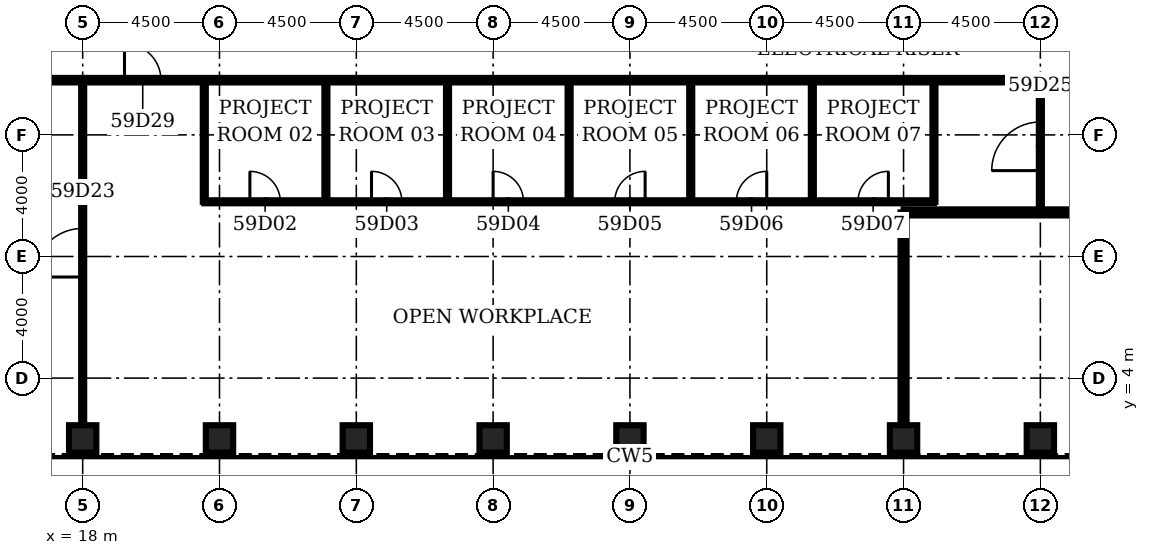
"""IFC4 building model, lengths in metres.
Left out: names, types, materials, properties, quantities, classifications, styles, units other than length and angle.
Written with IfcOpenShell. Run it as: python <this file> out.ifc"""

import sys

from ifc_helpers import new_model, si_unit, direction, frame, frame_2d, origin, origin_2d, place, context, subcontext, project, spatial, rectangle, hollow_rectangle, extrude, element, fill, save


model = new_model("IFC4")
c1 = context("Model", 3, precision=1e-05, world=origin(), true_north=direction((0.0, 1.0)))
c2 = subcontext(c1, "Body", "Model", "MODEL_VIEW")
j1 = project(units=[si_unit("LENGTHUNIT", "METRE"), si_unit("PLANEANGLEUNIT", "RADIAN")], contexts=[c1])
p1 = place(None, origin())
s1 = spatial("IfcSite", under=j1, at=p1, CompositionType="ELEMENT")
p2 = place(p1, origin())
s2 = spatial("IfcBuilding", under=s1, at=p2, CompositionType="ELEMENT")
p3 = place(p2, frame((0.0, 0.0, 261.4)))
s3 = spatial("IfcBuildingStorey", under=s2, at=p3, CompositionType="ELEMENT", Elevation=261.4)
for number, where, z_axis, x_axis in (
    (1, (18.0, 2.0, 0.0), (0.0, 0.0, 1.0), (0.0, 1.0, 0.0)),
    (2, (22.5, 2.0, 0.0), (0.0, 0.0, 1.0), (0.0, 1.0, 0.0)),
    (3, (27.0, 2.0, 0.0), (0.0, 0.0, 1.0), (0.0, 1.0, 0.0)),
    (4, (31.5, 2.0, 0.0), (0.0, 0.0, 1.0), (0.0, 1.0, 0.0)),
    (5, (36.0, 2.0, 0.0), (0.0, 0.0, 1.0), (0.0, 1.0, 0.0)),
    (6, (40.5, 2.0, 0.0), (0.0, 0.0, 1.0), (0.0, 1.0, 0.0)),
    (7, (45.0, 2.0, 0.0), (0.0, 0.0, 1.0), (0.0, 1.0, 0.0)),
    (8, (49.5, 2.0, 0.0), (0.0, 0.0, 1.0), (0.0, 1.0, 0.0)),
):
    element("IfcColumn", number, at=place(p3, frame(where, z_axis=z_axis, x_axis=x_axis)), inside=s3, PredefinedType="COLUMN", context=c2, shape_type="SweptSolid", body=[
        extrude(hollow_rectangle(XDim=0.9, YDim=0.9, WallThickness=0.07, at=origin_2d()), origin(), (0.0, 0.0, 1.0), 4.2),
    ])
p4 = place(p3, frame((45.0, 9.45, 0.0), z_axis=(0.0, 0.0, 1.0), x_axis=(1.0, 0.0, 0.0)))
e9 = element("IfcWall", 9, at=p4, inside=s3, PredefinedType="PARTITIONING", context=c2, shape_type="SweptSolid", body=[
    extrude(rectangle(XDim=18.0, YDim=0.2, at=frame_2d((9.0, 0.0))), origin(), (0.0, 0.0, 1.0), 3.0),
])
p5 = place(p4, frame((8.2, 0.0, 0.0)))
e10 = element("IfcOpeningElement", 10, at=p5, cuts=e9, PredefinedType="OPENING", context=c2, shape_type="SweptSolid", body=[
    extrude(rectangle(XDim=1.6, YDim=2.1, at=frame_2d((0.8, 1.05))), frame((0.0, 0.11, 0.0), z_axis=(0.0, -1.0, 0.0), x_axis=(1.0, 0.0, 0.0)), (0.0, 0.0, 1.0), 0.22),
])
p6 = place(p3, frame((22.0, 9.8, 0.0), z_axis=(0.0, 0.0, 1.0), x_axis=(1.0, 0.0, 0.0)))
e11 = element("IfcWall", 11, at=p6, inside=s3, PredefinedType="PARTITIONING", context=c2, shape_type="SweptSolid", body=[
    extrude(rectangle(XDim=24.0, YDim=0.1, at=frame_2d((12.0, 0.0))), origin(), (0.0, 0.0, 1.0), 3.0),
])
p7 = place(p6, frame((1.5, 0.0, 0.0)))
e12 = element("IfcOpeningElement", 12, at=p7, cuts=e11, PredefinedType="OPENING", context=c2, shape_type="SweptSolid", body=[
    extrude(rectangle(XDim=1.0, YDim=2.1, at=frame_2d((0.5, 1.05))), frame((0.0, 0.06, 0.0), z_axis=(0.0, -1.0, 0.0), x_axis=(1.0, 0.0, 0.0)), (0.0, 0.0, 1.0), 0.12),
])
p8 = place(p6, frame((5.5, 0.0, 0.0)))
e13 = element("IfcOpeningElement", 13, at=p8, cuts=e11, PredefinedType="OPENING", context=c2, shape_type="SweptSolid", body=[
    extrude(rectangle(XDim=1.0, YDim=2.1, at=frame_2d((0.5, 1.05))), frame((0.0, 0.06, 0.0), z_axis=(0.0, -1.0, 0.0), x_axis=(1.0, 0.0, 0.0)), (0.0, 0.0, 1.0), 0.12),
])
p9 = place(p6, frame((9.5, 0.0, 0.0)))
e14 = element("IfcOpeningElement", 14, at=p9, cuts=e11, PredefinedType="OPENING", context=c2, shape_type="SweptSolid", body=[
    extrude(rectangle(XDim=1.0, YDim=2.1, at=frame_2d((0.5, 1.05))), frame((0.0, 0.06, 0.0), z_axis=(0.0, -1.0, 0.0), x_axis=(1.0, 0.0, 0.0)), (0.0, 0.0, 1.0), 0.12),
])
p10 = place(p6, frame((13.5, 0.0, 0.0)))
e15 = element("IfcOpeningElement", 15, at=p10, cuts=e11, PredefinedType="OPENING", context=c2, shape_type="SweptSolid", body=[
    extrude(rectangle(XDim=1.0, YDim=2.1, at=frame_2d((0.5, 1.05))), frame((0.0, 0.06, 0.0), z_axis=(0.0, -1.0, 0.0), x_axis=(1.0, 0.0, 0.0)), (0.0, 0.0, 1.0), 0.12),
])
p11 = place(p6, frame((17.5, 0.0, 0.0)))
e16 = element("IfcOpeningElement", 16, at=p11, cuts=e11, PredefinedType="OPENING", context=c2, shape_type="SweptSolid", body=[
    extrude(rectangle(XDim=1.0, YDim=2.1, at=frame_2d((0.5, 1.05))), frame((0.0, 0.06, 0.0), z_axis=(0.0, -1.0, 0.0), x_axis=(1.0, 0.0, 0.0)), (0.0, 0.0, 1.0), 0.12),
])
p12 = place(p6, frame((21.5, 0.0, 0.0)))
e17 = element("IfcOpeningElement", 17, at=p12, cuts=e11, PredefinedType="OPENING", context=c2, shape_type="SweptSolid", body=[
    extrude(rectangle(XDim=1.0, YDim=2.1, at=frame_2d((0.5, 1.05))), frame((0.0, 0.06, 0.0), z_axis=(0.0, -1.0, 0.0), x_axis=(1.0, 0.0, 0.0)), (0.0, 0.0, 1.0), 0.12),
])
p13 = place(p3, frame((15.2, 13.8, 0.0), z_axis=(0.0, 0.0, 1.0), x_axis=(1.0, 0.0, 0.0)))
e18 = element("IfcWall", 18, at=p13, inside=s3, PredefinedType="PARTITIONING", context=c2, shape_type="SweptSolid", body=[
    extrude(rectangle(XDim=41.6, YDim=0.15, at=frame_2d((20.8, 0.0))), origin(), (0.0, 0.0, 1.0), 3.0),
])
p14 = place(p13, frame((4.175, 0.0, 0.0)))
e19 = element("IfcOpeningElement", 19, at=p14, cuts=e18, PredefinedType="OPENING", context=c2, shape_type="SweptSolid", body=[
    extrude(rectangle(XDim=1.2, YDim=2.1, at=frame_2d((0.6, 1.05))), frame((0.0, 0.085, 0.0), z_axis=(0.0, -1.0, 0.0), x_axis=(1.0, 0.0, 0.0)), (0.0, 0.0, 1.0), 0.17),
])
p15 = place(p3, frame((18.0, 2.45, 0.0), z_axis=(0.0, 0.0, 1.0), x_axis=(0.0, 1.0, 0.0)))
e20 = element("IfcWall", 20, at=p15, inside=s3, PredefinedType="PARTITIONING", context=c2, shape_type="SweptSolid", body=[
    extrude(rectangle(XDim=11.35, YDim=0.1, at=frame_2d((5.675, 0.0))), origin(), (0.0, 0.0, 1.0), 3.0),
])
p16 = place(p15, frame((4.875, 0.0, 0.0)))
e21 = element("IfcOpeningElement", 21, at=p16, cuts=e20, PredefinedType="OPENING", context=c2, shape_type="SweptSolid", body=[
    extrude(rectangle(XDim=1.6, YDim=2.1, at=frame_2d((0.8, 1.05))), frame((0.0, 0.06, 0.0), z_axis=(0.0, -1.0, 0.0), x_axis=(1.0, 0.0, 0.0)), (0.0, 0.0, 1.0), 0.12),
])
p17 = place(p3, frame((22.0, 9.8, 0.0), z_axis=(0.0, 0.0, 1.0), x_axis=(0.0, 1.0, 0.0)))
e22 = element("IfcWall", 22, at=p17, inside=s3, PredefinedType="PARTITIONING", context=c2, shape_type="SweptSolid", body=[
    extrude(rectangle(XDim=4.0, YDim=0.1, at=frame_2d((2.0, 0.0))), origin(), (0.0, 0.0, 1.0), 3.0),
])
p18 = place(p3, frame((26.0, 9.8, 0.0), z_axis=(0.0, 0.0, 1.0), x_axis=(0.0, 1.0, 0.0)))
e23 = element("IfcWall", 23, at=p18, inside=s3, PredefinedType="PARTITIONING", context=c2, shape_type="SweptSolid", body=[
    extrude(rectangle(XDim=4.0, YDim=0.1, at=frame_2d((2.0, 0.0))), origin(), (0.0, 0.0, 1.0), 2.942),
])
for number, where, z_axis, x_axis in (
    (24, (30.0, 9.8, 0.0), (0.0, 0.0, 1.0), (0.0, 1.0, 0.0)),
    (25, (34.0, 9.8, 0.0), (0.0, 0.0, 1.0), (0.0, 1.0, 0.0)),
    (26, (38.0, 9.8, 0.0), (0.0, 0.0, 1.0), (0.0, 1.0, 0.0)),
    (27, (42.0, 9.8, 0.0), (0.0, 0.0, 1.0), (0.0, 1.0, 0.0)),
):
    element("IfcWall", number, at=place(p3, frame(where, z_axis=z_axis, x_axis=x_axis)), inside=s3, PredefinedType="PARTITIONING", context=c2, shape_type="SweptSolid", body=[
        extrude(rectangle(XDim=4.0, YDim=0.1, at=frame_2d((2.0, 0.0))), origin(), (0.0, 0.0, 1.0), 3.0),
    ])
p19 = place(p3, frame((45.0, 2.45, 0.0), z_axis=(0.0, 0.0, 1.0), x_axis=(0.0, 1.0, 0.0)))
e28 = element("IfcWall", 28, at=p19, inside=s3, PredefinedType="PARTITIONING", context=c2, shape_type="SweptSolid", body=[
    extrude(rectangle(XDim=7.0, YDim=0.2, at=frame_2d((3.5, 0.0))), origin(), (0.0, 0.0, 1.0), 3.0),
])
p20 = place(p3, frame((46.0, 9.8, 0.0), z_axis=(0.0, 0.0, 1.0), x_axis=(0.0, 1.0, 0.0)))
e29 = element("IfcWall", 29, at=p20, inside=s3, PredefinedType="PARTITIONING", context=c2, shape_type="SweptSolid", body=[
    extrude(rectangle(XDim=4.0, YDim=0.1, at=frame_2d((2.0, 0.0))), origin(), (0.0, 0.0, 1.0), 2.942),
])
p21 = place(p3, frame((49.5, 9.45, 0.0), z_axis=(0.0, 0.0, 1.0), x_axis=(0.0, 1.0, 0.0)))
e30 = element("IfcWall", 30, at=p21, inside=s3, PredefinedType="PARTITIONING", context=c2, shape_type="SweptSolid", body=[
    extrude(rectangle(XDim=4.35, YDim=0.1, at=frame_2d((2.175, 0.0))), origin(), (0.0, 0.0, 1.0), 3.0),
])
p22 = place(p21, frame((1.375, 0.0, 0.0)))
e31 = element("IfcOpeningElement", 31, at=p22, cuts=e30, PredefinedType="OPENING", context=c2, shape_type="SweptSolid", body=[
    extrude(rectangle(XDim=1.6, YDim=2.1, at=frame_2d((0.8, 1.05))), frame((0.0, 0.06, 0.0), z_axis=(0.0, -1.0, 0.0), x_axis=(1.0, 0.0, 0.0)), (0.0, 0.0, 1.0), 0.12),
])
p23 = place(p7, origin())
e32 = element("IfcDoor", 32, at=p23, inside=s3, OperationType="SINGLE_SWING_LEFT", PredefinedType="DOOR", context=c2, shape_type="SweptSolid", body=[
    extrude(rectangle(XDim=1.0, YDim=2.1, at=frame_2d((0.5, 1.05))), frame((0.0, 0.025, 0.0), z_axis=(0.0, -1.0, 0.0), x_axis=(1.0, 0.0, 0.0)), (0.0, 0.0, 1.0), 0.05),
])
fill(e12, e32)
p24 = place(p8, origin())
e33 = element("IfcDoor", 33, at=p24, inside=s3, OperationType="SINGLE_SWING_LEFT", PredefinedType="DOOR", context=c2, shape_type="SweptSolid", body=[
    extrude(rectangle(XDim=1.0, YDim=2.1, at=frame_2d((0.5, 1.05))), frame((0.0, 0.025, 0.0), z_axis=(0.0, -1.0, 0.0), x_axis=(1.0, 0.0, 0.0)), (0.0, 0.0, 1.0), 0.05),
])
fill(e13, e33)
p25 = place(p9, origin())
e34 = element("IfcDoor", 34, at=p25, inside=s3, OperationType="SINGLE_SWING_LEFT", PredefinedType="DOOR", context=c2, shape_type="SweptSolid", body=[
    extrude(rectangle(XDim=1.0, YDim=2.1, at=frame_2d((0.5, 1.05))), frame((0.0, 0.025, 0.0), z_axis=(0.0, -1.0, 0.0), x_axis=(1.0, 0.0, 0.0)), (0.0, 0.0, 1.0), 0.05),
])
fill(e14, e34)
p26 = place(p10, origin())
e35 = element("IfcDoor", 35, at=p26, inside=s3, OperationType="SINGLE_SWING_RIGHT", PredefinedType="DOOR", context=c2, shape_type="SweptSolid", body=[
    extrude(rectangle(XDim=1.0, YDim=2.1, at=frame_2d((0.5, 1.05))), frame((0.0, 0.025, 0.0), z_axis=(0.0, -1.0, 0.0), x_axis=(1.0, 0.0, 0.0)), (0.0, 0.0, 1.0), 0.05),
])
fill(e15, e35)
p27 = place(p11, origin())
e36 = element("IfcDoor", 36, at=p27, inside=s3, OperationType="SINGLE_SWING_RIGHT", PredefinedType="DOOR", context=c2, shape_type="SweptSolid", body=[
    extrude(rectangle(XDim=1.0, YDim=2.1, at=frame_2d((0.5, 1.05))), frame((0.0, 0.025, 0.0), z_axis=(0.0, -1.0, 0.0), x_axis=(1.0, 0.0, 0.0)), (0.0, 0.0, 1.0), 0.05),
])
fill(e16, e36)
p28 = place(p12, origin())
e37 = element("IfcDoor", 37, at=p28, inside=s3, OperationType="SINGLE_SWING_RIGHT", PredefinedType="DOOR", context=c2, shape_type="SweptSolid", body=[
    extrude(rectangle(XDim=1.0, YDim=2.1, at=frame_2d((0.5, 1.05))), frame((0.0, 0.025, 0.0), z_axis=(0.0, -1.0, 0.0), x_axis=(1.0, 0.0, 0.0)), (0.0, 0.0, 1.0), 0.05),
])
fill(e17, e37)
p29 = place(p16, origin())
e38 = element("IfcDoor", 38, at=p29, inside=s3, OperationType="SINGLE_SWING_LEFT", PredefinedType="DOOR", context=c2, shape_type="SweptSolid", body=[
    extrude(rectangle(XDim=1.6, YDim=2.1, at=frame_2d((0.8, 1.05))), frame((0.0, 0.025, 0.0), z_axis=(0.0, -1.0, 0.0), x_axis=(1.0, 0.0, 0.0)), (0.0, 0.0, 1.0), 0.05),
])
fill(e21, e38)
p30 = place(p22, origin())
e39 = element("IfcDoor", 39, at=p30, inside=s3, OperationType="SINGLE_SWING_LEFT", PredefinedType="DOOR", context=c2, shape_type="SweptSolid", body=[
    extrude(rectangle(XDim=1.6, YDim=2.1, at=frame_2d((0.8, 1.05))), frame((0.0, 0.025, 0.0), z_axis=(0.0, -1.0, 0.0), x_axis=(1.0, 0.0, 0.0)), (0.0, 0.0, 1.0), 0.05),
])
fill(e31, e39)
p31 = place(p14, origin())
e40 = element("IfcDoor", 40, at=p31, inside=s3, OperationType="SINGLE_SWING_LEFT", PredefinedType="DOOR", context=c2, shape_type="SweptSolid", body=[
    extrude(rectangle(XDim=1.2, YDim=2.1, at=frame_2d((0.6, 1.05))), frame((0.0, 0.025, 0.0), z_axis=(0.0, -1.0, 0.0), x_axis=(1.0, 0.0, 0.0)), (0.0, 0.0, 1.0), 0.05),
])
fill(e19, e40)
save(model, sys.argv[1])
